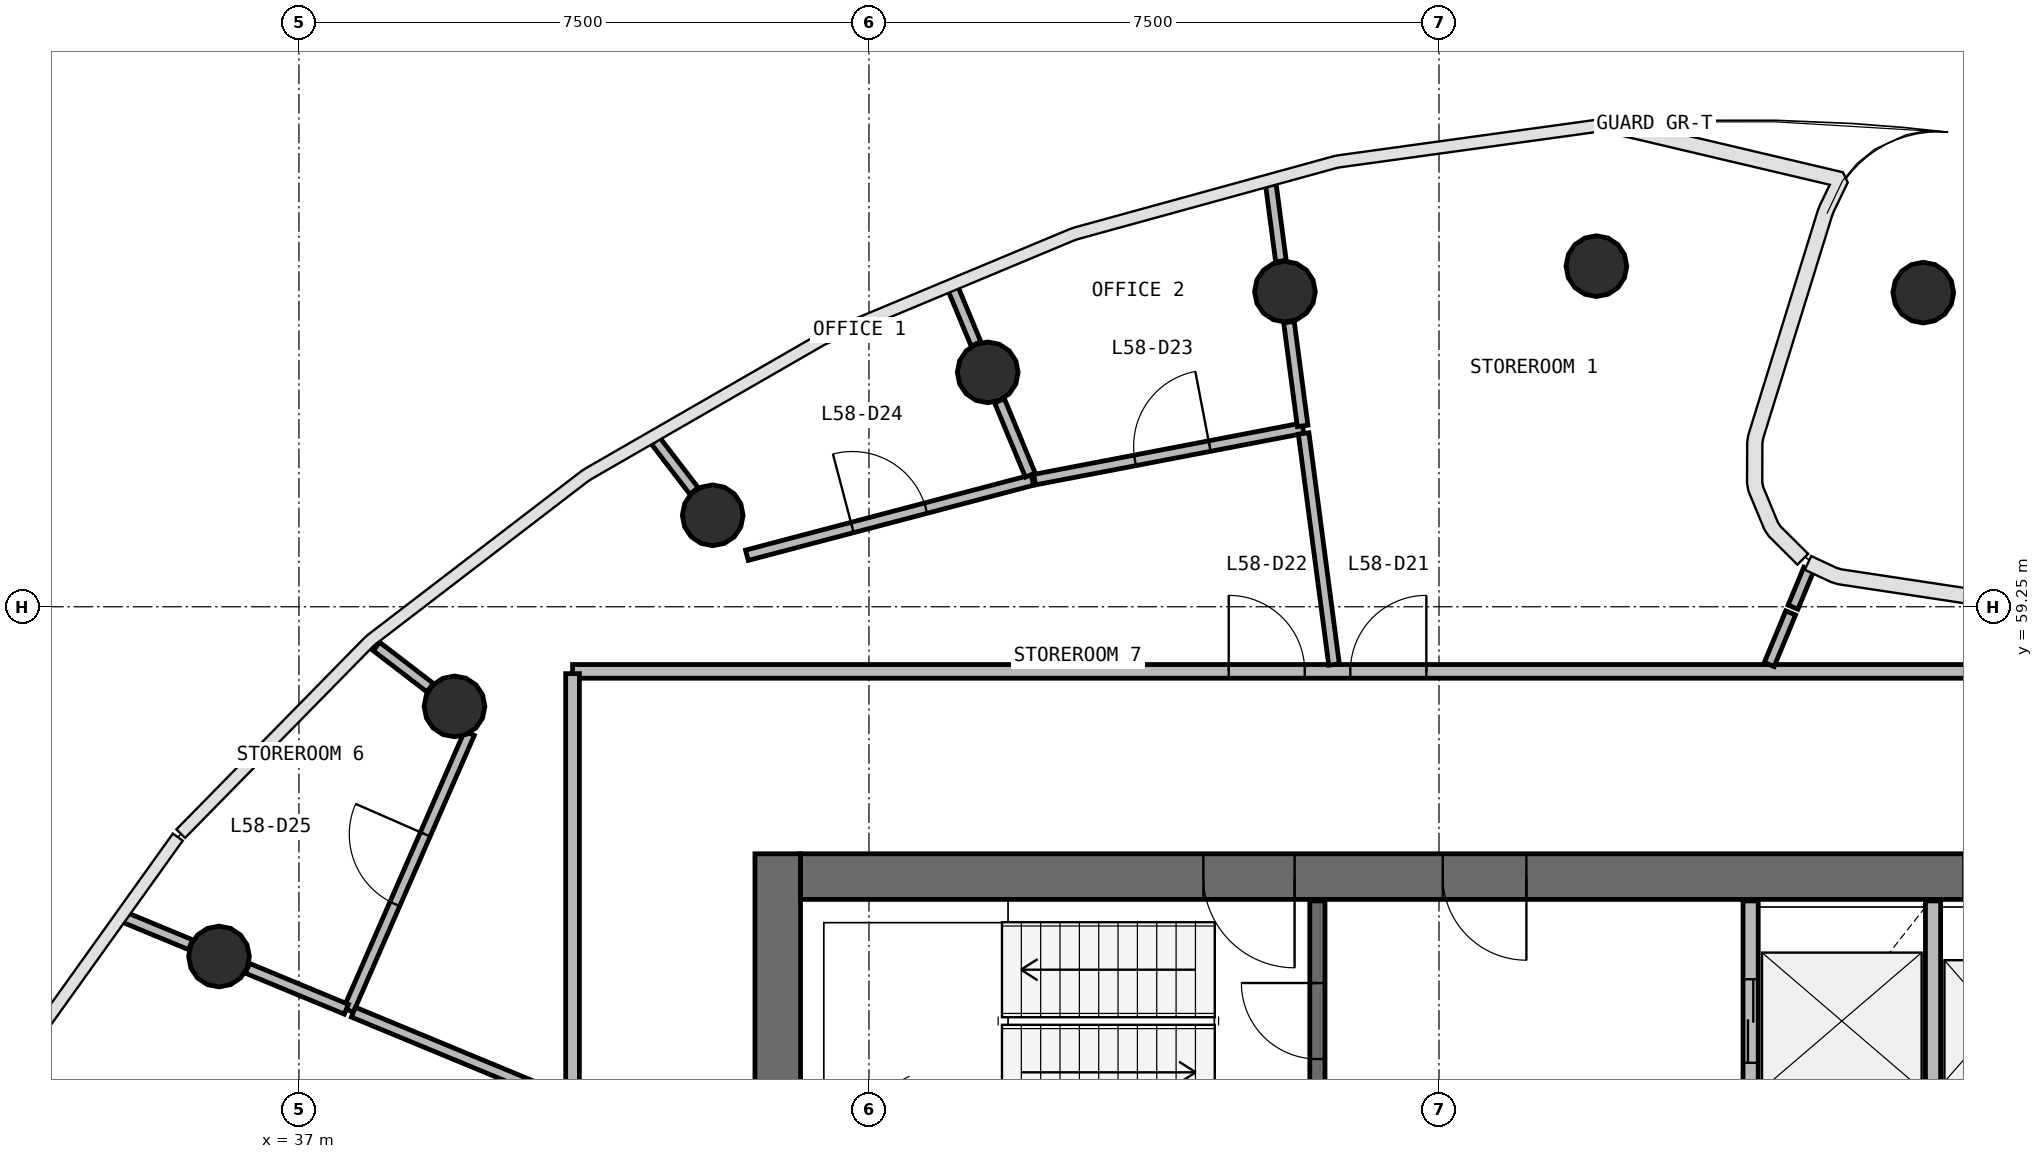
"""IFC4 building model, lengths in metres.
Left out: names, types, materials, properties, quantities, classifications, styles, units other than length and angle.
Written with IfcOpenShell. Run it as: python <this file> out.ifc"""

import sys

from ifc_helpers import new_model, si_unit, direction, frame, frame_2d, origin, origin_2d, place, context, subcontext, project, spatial, rectangle, circle, extrude, source, transform, mapped, element, fill, save


model = new_model("IFC4")
c1 = context("Model", 3, precision=1e-05, world=origin(), true_north=direction((0.0, 1.0)))
c2 = subcontext(c1, "Body", "Model", "MODEL_VIEW")
j1 = project(units=[si_unit("LENGTHUNIT", "METRE"), si_unit("PLANEANGLEUNIT", "RADIAN")], contexts=[c1])
p1 = place(None, origin())
s1 = spatial("IfcSite", under=j1, at=p1, CompositionType="ELEMENT")
p2 = place(p1, origin())
s2 = spatial("IfcBuilding", under=s1, at=p2, CompositionType="ELEMENT")
p3 = place(p2, frame((0.0, 0.0, 238.4)))
s3 = spatial("IfcBuildingStorey", under=s2, at=p3, CompositionType="ELEMENT", Elevation=238.4)
p4 = place(p3, frame((43.3, 56.0, 0.0), z_axis=(0.0, 0.0, 1.0), x_axis=(0.0, -1.0, 0.0)))
e1 = element("IfcWall", 1, at=p4, inside=s3, PredefinedType="SHEAR", context=c2, shape_type="SweptSolid", body=[
    extrude(rectangle(XDim=16.0, YDim=0.6, at=frame_2d((8.0, 0.0))), origin(), (0.0, 0.0, 1.0), 3.9),
])
p5 = place(p4, frame((7.1, 0.0, 0.0)))
e2 = element("IfcOpeningElement", 2, at=p5, cuts=e1, PredefinedType="OPENING", context=c2, shape_type="SweptSolid", body=[
    extrude(rectangle(XDim=1.8, YDim=2.1, at=frame_2d((0.9, 1.05))), frame((0.0, 0.31, 0.0), z_axis=(0.0, -1.0, 0.0), x_axis=(1.0, 0.0, 0.0)), (0.0, 0.0, 1.0), 0.62),
])
p6 = place(p3, frame((60.4, 55.7, 0.0), z_axis=(0.0, 0.0, 1.0), x_axis=(-1.0, 0.0, 0.0)))
e3 = element("IfcWall", 3, at=p6, inside=s3, PredefinedType="SHEAR", context=c2, shape_type="SweptSolid", body=[
    extrude(rectangle(XDim=16.8, YDim=0.6, at=frame_2d((8.4, 0.0))), origin(), (0.0, 0.0, 1.0), 3.9),
])
p7 = place(p6, frame((0.4, 0.0, 0.0)))
e4 = element("IfcOpeningElement", 4, at=p7, cuts=e3, PredefinedType="OPENING", context=c2, shape_type="SweptSolid", body=[
    extrude(rectangle(XDim=1.1, YDim=2.1, at=frame_2d((0.55, 1.05))), frame((0.0, 0.31, 0.0), z_axis=(0.0, -1.0, 0.0), x_axis=(1.0, 0.0, 0.0)), (0.0, 0.0, 1.0), 0.62),
])
p8 = place(p6, frame((10.3, 0.0, 0.0)))
e5 = element("IfcOpeningElement", 5, at=p8, cuts=e3, PredefinedType="OPENING", context=c2, shape_type="SweptSolid", body=[
    extrude(rectangle(XDim=1.2, YDim=2.1, at=frame_2d((0.6, 1.05))), frame((0.0, 0.31, 0.0), z_axis=(0.0, -1.0, 0.0), x_axis=(1.0, 0.0, 0.0)), (0.0, 0.0, 1.0), 0.62),
])
p9 = place(p6, frame((7.25, 0.0, 0.0)))
e6 = element("IfcOpeningElement", 6, at=p9, cuts=e3, PredefinedType="OPENING", context=c2, shape_type="SweptSolid", body=[
    extrude(rectangle(XDim=1.1, YDim=2.1, at=frame_2d((0.55, 1.05))), frame((0.0, 0.31, 0.0), z_axis=(0.0, -1.0, 0.0), x_axis=(1.0, 0.0, 0.0)), (0.0, 0.0, 1.0), 0.62),
])
m1 = source(origin(), c2, "Body", "SweptSolid", [
    extrude(circle(Radius=0.4, at=origin_2d()), origin(), (0.0, 0.0, 1.0), 3.9),
])
for number, where, z_axis, x_axis in (
    (7, (58.372, 63.383, 0.0), (0.0, 0.0, 1.0), (1.0, 0.0, 0.0)),
    (8, (54.071, 63.731, 0.0), (0.0, 0.0, 1.0), (1.0, 0.0, 0.0)),
    (9, (49.973, 63.396, 0.0), (0.0, 0.0, 1.0), (1.0, 0.0, 0.0)),
    (10, (46.063, 62.334, 0.0), (0.0, 0.0, 1.0), (1.0, 0.0, 0.0)),
    (11, (42.444, 60.453, 0.0), (0.0, 0.0, 1.0), (1.0, 0.0, 0.0)),
    (12, (39.047, 57.939, 0.0), (0.0, 0.0, 1.0), (1.0, 0.0, 0.0)),
    (13, (35.948, 54.649, 0.0), (0.0, 0.0, 1.0), (1.0, 0.0, 0.0)),
):
    element("IfcColumn", number, at=place(p3, frame(where, z_axis=z_axis, x_axis=x_axis)), inside=s3, PredefinedType="COLUMN", context=c2, shape_type="MappedRepresentation", body=[
        mapped(m1, transform((0.0, 0.0, 0.0), scale=1.0)),
    ])
p10 = place(p3, frame((50.4, 52.43, 0.0), z_axis=(0.0, 0.0, 1.0), x_axis=(0.0, 1.0, 0.0)))
e14 = element("IfcWall", 14, at=p10, inside=s3, PredefinedType="SOLIDWALL", context=c2, shape_type="SweptSolid", body=[
    extrude(rectangle(XDim=2.95, YDim=0.2, at=frame_2d((1.475, 0.0))), origin(), (0.0, 0.0, 1.0), 3.58),
])
p11 = place(p10, frame((0.87, 0.0, 0.0)))
e15 = element("IfcOpeningElement", 15, at=p11, cuts=e14, PredefinedType="OPENING", context=c2, shape_type="SweptSolid", body=[
    extrude(rectangle(XDim=1.0, YDim=2.1, at=frame_2d((0.5, 1.05))), frame((0.0, 0.11, 0.0), z_axis=(0.0, -1.0, 0.0), x_axis=(1.0, 0.0, 0.0)), (0.0, 0.0, 1.0), 0.22),
])
p12 = place(p3, frame((56.1, 55.38, 0.0), z_axis=(0.0, 0.0, 1.0), x_axis=(0.0, -1.0, 0.0)))
e16 = element("IfcWall", 16, at=p12, inside=s3, PredefinedType="SOLIDWALL", context=c2, shape_type="SweptSolid", body=[
    extrude(rectangle(XDim=2.98, YDim=0.2, at=frame_2d((1.49, 0.0))), origin(), (0.0, 0.0, 1.0), 3.58),
])
p13 = place(p12, frame((1.03, 0.0, 0.0)))
e17 = element("IfcOpeningElement", 17, at=p13, cuts=e16, PredefinedType="OPENING", context=c2, shape_type="SweptSolid", body=[
    extrude(rectangle(XDim=1.1, YDim=2.1, at=frame_2d((0.55, 1.05))), frame((0.0, 0.11, 0.0), z_axis=(0.0, -1.0, 0.0), x_axis=(1.0, 0.0, 0.0)), (0.0, 0.0, 1.0), 0.22),
])
p14 = place(p3, frame((58.5, 52.4, 0.0), z_axis=(0.0, 0.0, 1.0), x_axis=(0.0, 1.0, 0.0)))
e18 = element("IfcWall", 18, at=p14, inside=s3, PredefinedType="SOLIDWALL", context=c2, shape_type="SweptSolid", body=[
    extrude(rectangle(XDim=2.98, YDim=0.2, at=frame_2d((1.49, 0.0))), origin(), (0.0, 0.0, 1.0), 3.58),
])
p15 = place(p3, frame((40.6, 58.4, 0.0), z_axis=(0.0, 0.0, 1.0), x_axis=(1.0, 0.0, 0.0)))
e19 = element("IfcWall", 19, at=p15, inside=s3, PredefinedType="PARTITIONING", context=c2, shape_type="SweptSolid", body=[
    extrude(rectangle(XDim=21.483, YDim=0.18, at=frame_2d((10.742, 0.0))), origin(), (0.0, 0.0, 1.0), 2.88),
])
p16 = place(p15, frame((10.233, 0.0, 0.0)))
e20 = element("IfcOpeningElement", 20, at=p16, cuts=e19, PredefinedType="OPENING", context=c2, shape_type="SweptSolid", body=[
    extrude(rectangle(XDim=1.0, YDim=2.1, at=frame_2d((0.5, 1.05))), frame((0.0, 0.1, 0.0), z_axis=(0.0, -1.0, 0.0), x_axis=(1.0, 0.0, 0.0)), (0.0, 0.0, 1.0), 0.2),
])
p17 = place(p15, frame((8.634, 0.0, 0.0)))
e21 = element("IfcOpeningElement", 21, at=p17, cuts=e19, PredefinedType="OPENING", context=c2, shape_type="SweptSolid", body=[
    extrude(rectangle(XDim=1.0, YDim=2.1, at=frame_2d((0.5, 1.05))), frame((0.0, 0.1, 0.0), z_axis=(0.0, -1.0, 0.0), x_axis=(1.0, 0.0, 0.0)), (0.0, 0.0, 1.0), 0.2),
])
p18 = place(p3, frame((40.6, 37.63, 0.0), z_axis=(0.0, 0.0, 1.0), x_axis=(0.0, 1.0, 0.0)))
e22 = element("IfcWall", 22, at=p18, inside=s3, PredefinedType="PARTITIONING", context=c2, shape_type="SweptSolid", body=[
    extrude(rectangle(XDim=20.74, YDim=0.18, at=frame_2d((10.37, 0.0))), origin(), (0.0, 0.0, 1.0), 2.88),
])
p19 = place(p18, frame((9.89, 0.0, 0.0)))
e23 = element("IfcOpeningElement", 23, at=p19, cuts=e22, PredefinedType="OPENING", context=c2, shape_type="SweptSolid", body=[
    extrude(rectangle(XDim=1.0, YDim=2.1, at=frame_2d((0.5, 1.05))), frame((0.0, 0.1, 0.0), z_axis=(0.0, -1.0, 0.0), x_axis=(1.0, 0.0, 0.0)), (0.0, 0.0, 1.0), 0.2),
])
p20 = place(p18, frame((4.29, 0.0, 0.0)))
e24 = element("IfcOpeningElement", 24, at=p20, cuts=e22, PredefinedType="OPENING", context=c2, shape_type="SweptSolid", body=[
    extrude(rectangle(XDim=1.0, YDim=2.1, at=frame_2d((0.5, 1.05))), frame((0.0, 0.1, 0.0), z_axis=(0.0, -1.0, 0.0), x_axis=(1.0, 0.0, 0.0)), (0.0, 0.0, 1.0), 0.2),
])
p21 = place(p3, frame((37.652, 53.943, 0.0), z_axis=(0.0, 0.0, 1.0), x_axis=(0.400345057701, 0.916364466124, 0.0)))
e25 = element("IfcWall", 25, at=p21, inside=s3, PredefinedType="PARTITIONING", context=c2, shape_type="SweptSolid", body=[
    extrude(rectangle(XDim=3.974, YDim=0.14, at=frame_2d((1.987, 0.0))), origin(), (0.0, 0.0, 1.0), 2.88),
])
p22 = place(p21, frame((1.524, 0.0, 0.0)))
e26 = element("IfcOpeningElement", 26, at=p22, cuts=e25, PredefinedType="OPENING", context=c2, shape_type="SweptSolid", body=[
    extrude(rectangle(XDim=1.0, YDim=2.1, at=frame_2d((0.5, 1.05))), frame((0.0, 0.08, 0.0), z_axis=(0.0, -1.0, 0.0), x_axis=(1.0, 0.0, 0.0)), (0.0, 0.0, 1.0), 0.16),
])
p23 = place(p3, frame((42.894, 59.927, 0.0), z_axis=(0.0, 0.0, 1.0), x_axis=(0.967030550889, 0.254660388848, 0.0)))
e27 = element("IfcWall", 27, at=p23, inside=s3, PredefinedType="PARTITIONING", context=c2, shape_type="SweptSolid", body=[
    extrude(rectangle(XDim=3.884, YDim=0.14, at=frame_2d((1.942, 0.0))), origin(), (0.0, 0.0, 1.0), 2.88),
])
p24 = place(p23, frame((1.434, 0.0, 0.0)))
e28 = element("IfcOpeningElement", 28, at=p24, cuts=e27, PredefinedType="OPENING", context=c2, shape_type="SweptSolid", body=[
    extrude(rectangle(XDim=1.0, YDim=2.1, at=frame_2d((0.5, 1.05))), frame((0.0, 0.08, 0.0), z_axis=(0.0, -1.0, 0.0), x_axis=(1.0, 0.0, 0.0)), (0.0, 0.0, 1.0), 0.16),
])
p25 = place(p3, frame((46.679, 60.922, 0.0), z_axis=(0.0, 0.0, 1.0), x_axis=(0.982106581233, 0.188325949088, 0.0)))
e29 = element("IfcWall", 29, at=p25, inside=s3, PredefinedType="PARTITIONING", context=c2, shape_type="SweptSolid", body=[
    extrude(rectangle(XDim=3.595, YDim=0.14, at=frame_2d((1.797, 0.0))), origin(), (0.0, 0.0, 1.0), 2.88),
])
p26 = place(p25, frame((1.345, 0.0, 0.0)))
e30 = element("IfcOpeningElement", 30, at=p26, cuts=e29, PredefinedType="OPENING", context=c2, shape_type="SweptSolid", body=[
    extrude(rectangle(XDim=1.0, YDim=2.1, at=frame_2d((0.5, 1.05))), frame((0.0, 0.08, 0.0), z_axis=(0.0, -1.0, 0.0), x_axis=(1.0, 0.0, 0.0)), (0.0, 0.0, 1.0), 0.16),
])
p27 = place(p3, frame((50.619, 58.49, 0.0), z_axis=(0.0, 0.0, 1.0), x_axis=(-0.130510127223, 0.991446976238, 0.0)))
e31 = element("IfcWall", 31, at=p27, inside=s3, PredefinedType="PARTITIONING", context=c2, shape_type="SweptSolid", body=[
    extrude(rectangle(XDim=3.066, YDim=0.14, at=frame_2d((1.533, 0.0))), origin(), (0.0, 0.0, 1.0), 2.88),
])
p28 = place(p3, frame((40.51, 52.759, 0.0), z_axis=(0.0, 0.0, 1.0), x_axis=(-0.923863305003, 0.382722606687, 0.0)))
e32 = element("IfcWall", 32, at=p28, inside=s3, PredefinedType="PARTITIONING", context=c2, shape_type="SweptSolid", body=[
    extrude(rectangle(XDim=3.024, YDim=0.14, at=frame_2d((1.512, 0.0))), origin(), (0.0, 0.0, 1.0), 2.88),
])
p29 = place(p3, frame((37.624, 53.955, 0.0), z_axis=(0.0, 0.0, 1.0), x_axis=(-0.923828824713, 0.382805828886, 0.0)))
e33 = element("IfcWall", 33, at=p29, inside=s3, PredefinedType="PARTITIONING", context=c2, shape_type="SweptSolid", body=[
    extrude(rectangle(XDim=1.409, YDim=0.14, at=frame_2d((0.705, 0.0))), origin(), (0.0, 0.0, 1.0), 2.88),
])
p30 = place(p3, frame((50.206, 61.629, 0.0), z_axis=(0.0, 0.0, 1.0), x_axis=(-0.130596609213, 0.991435588257, 0.0)))
e34 = element("IfcWall", 34, at=p30, inside=s3, PredefinedType="PARTITIONING", context=c2, shape_type="SweptSolid", body=[
    extrude(rectangle(XDim=1.378, YDim=0.14, at=frame_2d((0.689, 0.0))), origin(), (0.0, 0.0, 1.0), 2.88),
])
p31 = place(p3, frame((46.623, 60.982, 0.0), z_axis=(0.0, 0.0, 1.0), x_axis=(-0.382698137168, 0.923873441445, 0.0)))
e35 = element("IfcWall", 35, at=p31, inside=s3, PredefinedType="PARTITIONING", context=c2, shape_type="SweptSolid", body=[
    extrude(rectangle(XDim=1.058, YDim=0.14, at=frame_2d((0.529, 0.0))), origin(), (0.0, 0.0, 1.0), 2.88),
])
p32 = place(p3, frame((49.92, 63.797, 0.0), z_axis=(0.0, 0.0, 1.0), x_axis=(-0.130723280959, 0.99141889422, 0.0)))
e36 = element("IfcWall", 36, at=p32, inside=s3, PredefinedType="PARTITIONING", context=c2, shape_type="SweptSolid", body=[
    extrude(rectangle(XDim=1.01, YDim=0.14, at=frame_2d((0.505, 0.0))), origin(), (0.0, 0.0, 1.0), 2.88),
])
p33 = place(p3, frame((35.574, 54.804, 0.0), z_axis=(0.0, 0.0, 1.0), x_axis=(-0.923887369877, 0.382664510743, 0.0)))
e37 = element("IfcWall", 37, at=p33, inside=s3, PredefinedType="PARTITIONING", context=c2, shape_type="SweptSolid", body=[
    extrude(rectangle(XDim=0.942, YDim=0.14, at=frame_2d((0.471, 0.0))), origin(), (0.0, 0.0, 1.0), 2.88),
])
p34 = place(p3, frame((38.726, 58.186, 0.0), z_axis=(0.0, 0.0, 1.0), x_axis=(-0.793377017635, 0.608730570851, 0.0)))
e38 = element("IfcWall", 38, at=p34, inside=s3, PredefinedType="PARTITIONING", context=c2, shape_type="SweptSolid", body=[
    extrude(rectangle(XDim=0.891, YDim=0.14, at=frame_2d((0.446, 0.0))), origin(), (0.0, 0.0, 1.0), 2.88),
])
p35 = place(p3, frame((42.198, 60.774, 0.0), z_axis=(0.0, 0.0, 1.0), x_axis=(-0.608690039121, 0.793408114576, 0.0)))
e39 = element("IfcWall", 39, at=p35, inside=s3, PredefinedType="PARTITIONING", context=c2, shape_type="SweptSolid", body=[
    extrude(rectangle(XDim=0.833, YDim=0.14, at=frame_2d((0.417, 0.0))), origin(), (0.0, 0.0, 1.0), 2.88),
])
p36 = place(p3, frame((56.345, 58.49, 0.0), z_axis=(0.0, 0.0, 1.0), x_axis=(0.382635119576, 0.923899542844, 0.0)))
e40 = element("IfcWall", 40, at=p36, inside=s3, PredefinedType="PARTITIONING", context=c2, shape_type="SweptSolid", body=[
    extrude(rectangle(XDim=0.736, YDim=0.14, at=frame_2d((0.368, 0.0))), origin(), (0.0, 0.0, 1.0), 2.88),
])
p37 = place(p3, frame((45.908, 62.708, 0.0), z_axis=(0.0, 0.0, 1.0), x_axis=(-0.382736533707, 0.923857535427, 0.0)))
e41 = element("IfcWall", 41, at=p37, inside=s3, PredefinedType="PARTITIONING", context=c2, shape_type="SweptSolid", body=[
    extrude(rectangle(XDim=0.785, YDim=0.14, at=frame_2d((0.392, 0.0))), origin(), (0.0, 0.0, 1.0), 2.88),
])
p38 = place(p3, frame((56.658, 59.245, 0.0), z_axis=(0.0, 0.0, 1.0), x_axis=(0.382657697953, 0.923890191634, 0.0)))
e42 = element("IfcWall", 42, at=p38, inside=s3, PredefinedType="PARTITIONING", context=c2, shape_type="SweptSolid", body=[
    extrude(rectangle(XDim=0.54, YDim=0.14, at=frame_2d((0.27, 0.0))), origin(), (0.0, 0.0, 1.0), 2.88),
])
m2 = source(origin(), c2, "Body", "SweptSolid", [
    extrude(rectangle(XDim=1.1, YDim=2.1, at=frame_2d((0.55, 1.05))), frame((0.0, 0.025, 0.0), z_axis=(0.0, -1.0, 0.0), x_axis=(1.0, 0.0, 0.0)), (0.0, 0.0, 1.0), 0.05),
])
p39 = place(p13, origin())
e43 = element("IfcDoor", 43, at=p39, inside=s3, OperationType="DOUBLE_DOOR_SLIDING", PredefinedType="USERDEFINED", context=c2, shape_type="MappedRepresentation", body=[
    mapped(m2, transform((0.0, 0.0, 0.0), scale=1.0)),
])
fill(e17, e43)
m3 = source(origin(), c2, "Body", "SweptSolid", [
    extrude(rectangle(XDim=1.2, YDim=2.1, at=frame_2d((0.6, 1.05))), frame((0.0, 0.025, 0.0), z_axis=(0.0, -1.0, 0.0), x_axis=(1.0, 0.0, 0.0)), (0.0, 0.0, 1.0), 0.05),
])
p40 = place(p8, origin())
e44 = element("IfcDoor", 44, at=p40, inside=s3, OperationType="SINGLE_SWING_LEFT", PredefinedType="DOOR", context=c2, shape_type="MappedRepresentation", body=[
    mapped(m3, transform((0.0, 0.0, 0.0), scale=1.0)),
])
fill(e5, e44)
m4 = source(origin(), c2, "Body", "SweptSolid", [
    extrude(rectangle(XDim=1.0, YDim=2.1, at=frame_2d((0.5, 1.05))), frame((0.0, 0.025, 0.0), z_axis=(0.0, -1.0, 0.0), x_axis=(1.0, 0.0, 0.0)), (0.0, 0.0, 1.0), 0.05),
])
p41 = place(p11, origin())
e45 = element("IfcDoor", 45, at=p41, inside=s3, OperationType="SINGLE_SWING_RIGHT", PredefinedType="DOOR", context=c2, shape_type="MappedRepresentation", body=[
    mapped(m4, transform((0.0, 0.0, 0.0), scale=1.0)),
])
fill(e15, e45)
m5 = source(origin(), c2, "Body", "SweptSolid", [
    extrude(rectangle(XDim=1.1, YDim=2.1, at=frame_2d((0.55, 1.05))), frame((0.0, 0.025, 0.0), z_axis=(0.0, -1.0, 0.0), x_axis=(1.0, 0.0, 0.0)), (0.0, 0.0, 1.0), 0.05),
])
p42 = place(p9, origin())
e46 = element("IfcDoor", 46, at=p42, inside=s3, OperationType="SINGLE_SWING_LEFT", PredefinedType="DOOR", context=c2, shape_type="MappedRepresentation", body=[
    mapped(m5, transform((0.0, 0.0, 0.0), scale=1.0)),
])
fill(e6, e46)
m6 = source(origin(), c2, "Body", "SweptSolid", [
    extrude(rectangle(XDim=1.0, YDim=2.1, at=frame_2d((0.5, 1.05))), frame((0.0, 0.025, 0.0), z_axis=(0.0, -1.0, 0.0), x_axis=(1.0, 0.0, 0.0)), (0.0, 0.0, 1.0), 0.05),
])
p43 = place(p16, origin())
e47 = element("IfcDoor", 47, at=p43, inside=s3, OperationType="SINGLE_SWING_RIGHT", PredefinedType="DOOR", context=c2, shape_type="MappedRepresentation", body=[
    mapped(m6, transform((0.0, 0.0, 0.0), scale=1.0)),
])
fill(e20, e47)
p44 = place(p17, origin())
e48 = element("IfcDoor", 48, at=p44, inside=s3, OperationType="SINGLE_SWING_LEFT", PredefinedType="DOOR", context=c2, shape_type="MappedRepresentation", body=[
    mapped(m6, transform((0.0, 0.0, 0.0), scale=1.0)),
])
fill(e21, e48)
p45 = place(p26, origin())
e49 = element("IfcDoor", 49, at=p45, inside=s3, OperationType="SINGLE_SWING_RIGHT", PredefinedType="DOOR", context=c2, shape_type="MappedRepresentation", body=[
    mapped(m6, transform((0.0, 0.0, 0.0), scale=1.0)),
])
fill(e30, e49)
p46 = place(p24, origin())
e50 = element("IfcDoor", 50, at=p46, inside=s3, OperationType="SINGLE_SWING_LEFT", PredefinedType="DOOR", context=c2, shape_type="MappedRepresentation", body=[
    mapped(m6, transform((0.0, 0.0, 0.0), scale=1.0)),
])
fill(e28, e50)
p47 = place(p22, origin())
e51 = element("IfcDoor", 51, at=p47, inside=s3, OperationType="SINGLE_SWING_RIGHT", PredefinedType="DOOR", context=c2, shape_type="MappedRepresentation", body=[
    mapped(m6, transform((0.0, 0.0, 0.0), scale=1.0)),
])
fill(e26, e51)
save(model, sys.argv[1])
